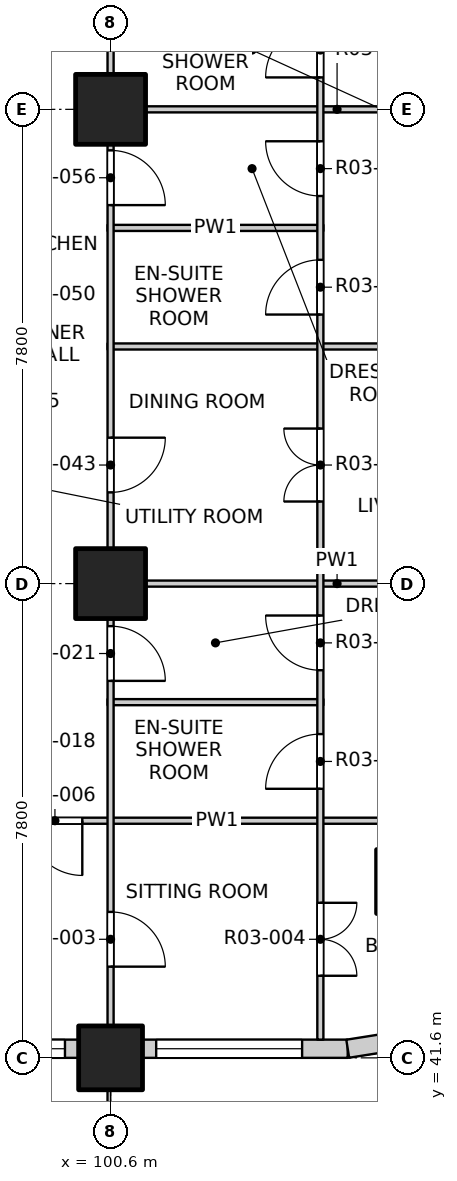
"""IFC4 building model, lengths in metres.
Left out: names, types, materials, properties, quantities, classifications, styles, units other than length and angle.
Written with IfcOpenShell. Run it as: python <this file> out.ifc"""

import sys

from ifc_helpers import new_model, si_unit, direction, frame, frame_2d, origin, origin_2d, place, context, subcontext, project, spatial, rectangle, extrude, element, fill, save


model = new_model("IFC4")
c1 = context("Model", 3, precision=1e-05, world=origin(), true_north=direction((0.0, 1.0)))
c2 = subcontext(c1, "Body", "Model", "MODEL_VIEW")
j1 = project(units=[si_unit("LENGTHUNIT", "METRE"), si_unit("PLANEANGLEUNIT", "RADIAN")], contexts=[c1])
p1 = place(None, origin())
s1 = spatial("IfcSite", under=j1, at=p1, CompositionType="ELEMENT")
p2 = place(p1, origin())
s2 = spatial("IfcBuilding", under=s1, at=p2, CompositionType="ELEMENT")
p3 = place(p2, frame((0.0, 0.0, 43.3)))
s3 = spatial("IfcBuildingStorey", under=s2, at=p3, CompositionType="ELEMENT", Elevation=43.3)
for number, where, z_axis, x_axis in (
    (1, (105.5, 44.5, -0.25), (0.0, 0.0, 1.0), (1.0, 0.0, 0.0)),
    (2, (100.6, 41.6, -0.25), (0.0, 0.0, 1.0), (1.0, 0.0, 0.0)),
):
    element("IfcColumn", number, at=place(p3, frame(where, z_axis=z_axis, x_axis=x_axis)), inside=s3, PredefinedType="COLUMN", context=c2, shape_type="SweptSolid", body=[
        extrude(rectangle(XDim=1.05, YDim=1.05, at=origin_2d()), origin(), (0.0, 0.0, 1.0), 3.35),
    ])
for number, where, z_axis, x_axis in (
    (3, (100.6, 49.4, -0.25), (0.0, 0.0, 1.0), (1.0, 0.0, 0.0)),
    (4, (100.6, 57.2, -0.25), (0.0, 0.0, 1.0), (1.0, 0.0, 0.0)),
):
    element("IfcColumn", number, at=place(p3, frame(where, z_axis=z_axis, x_axis=x_axis)), inside=s3, PredefinedType="COLUMN", context=c2, shape_type="SweptSolid", body=[
        extrude(rectangle(XDim=1.15, YDim=1.15, at=origin_2d()), origin(), (0.0, 0.0, 1.0), 3.35),
    ])
p4 = place(p3, frame((93.325, 41.75, 0.0), z_axis=(0.0, 0.0, 1.0), x_axis=(1.0, 0.0, 0.0)))
e5 = element("IfcWall", 5, at=p4, inside=s3, PredefinedType="SOLIDWALL", context=c2, shape_type="SweptSolid", body=[
    extrude(rectangle(XDim=6.75, YDim=0.3, at=frame_2d((3.375, 0.0))), origin(), (0.0, 0.0, 1.0), 3.1),
])
p5 = place(p4, frame((0.525, 0.0, 0.0)))
e6 = element("IfcOpeningElement", 6, at=p5, cuts=e5, PredefinedType="OPENING", context=c2, shape_type="SweptSolid", body=[
    extrude(rectangle(XDim=1.8, YDim=2.4, at=frame_2d((0.9, 1.2))), frame((0.0, 0.16, 0.0), z_axis=(0.0, -1.0, 0.0), x_axis=(1.0, 0.0, 0.0)), (0.0, 0.0, 1.0), 0.32),
])
p6 = place(p4, frame((4.125, 0.0, 0.9)))
e7 = element("IfcOpeningElement", 7, at=p6, cuts=e5, PredefinedType="OPENING", context=c2, shape_type="SweptSolid", body=[
    extrude(rectangle(XDim=2.4, YDim=1.8, at=frame_2d((1.2, 0.9))), frame((0.0, 0.16, 0.0), z_axis=(0.0, -1.0, 0.0), x_axis=(1.0, 0.0, 0.0)), (0.0, 0.0, 1.0), 0.32),
])
p7 = place(p3, frame((101.125, 41.75, 0.0), z_axis=(0.0, 0.0, 1.0), x_axis=(1.0, 0.0, 0.0)))
e8 = element("IfcWall", 8, at=p7, inside=s3, PredefinedType="SOLIDWALL", context=c2, shape_type="SweptSolid", body=[
    extrude(rectangle(XDim=3.375, YDim=0.3, at=frame_2d((1.688, 0.0))), origin(), (0.0, 0.0, 1.0), 3.1),
])
p8 = place(p7, frame((0.225, 0.0, 0.9)))
e9 = element("IfcOpeningElement", 9, at=p8, cuts=e8, PredefinedType="OPENING", context=c2, shape_type="SweptSolid", body=[
    extrude(rectangle(XDim=2.4, YDim=1.8, at=frame_2d((1.2, 0.9))), frame((0.0, 0.16, 0.0), z_axis=(0.0, -1.0, 0.0), x_axis=(1.0, 0.0, 0.0)), (0.0, 0.0, 1.0), 0.32),
])
p9 = place(p3, frame((104.5, 41.75, 0.0), z_axis=(0.0, 0.0, 1.0), x_axis=(0.987678452879, 0.156496880861, 0.0)))
e10 = element("IfcWall", 10, at=p9, inside=s3, PredefinedType="SOLIDWALL", context=c2, shape_type="SweptSolid", body=[
    extrude(rectangle(XDim=1.173, YDim=0.3, at=frame_2d((0.586, 0.0))), origin(), (0.0, 0.0, 1.0), 3.1),
])
p10 = place(p3, frame((96.6, 45.5, 0.0), z_axis=(0.0, 0.0, 1.0), x_axis=(1.0, 0.0, 0.0)))
e11 = element("IfcWall", 11, at=p10, inside=s3, PredefinedType="PARTITIONING", context=c2, shape_type="SweptSolid", body=[
    extrude(rectangle(XDim=11.5, YDim=0.1, at=frame_2d((5.75, 0.0))), origin(), (0.0, 0.0, 1.0), 3.1),
])
p11 = place(p10, frame((2.635, 0.0, 0.0)))
e12 = element("IfcOpeningElement", 12, at=p11, cuts=e11, PredefinedType="OPENING", context=c2, shape_type="SweptSolid", body=[
    extrude(rectangle(XDim=0.9, YDim=2.1, at=frame_2d((0.45, 1.05))), frame((0.0, 0.06, 0.0), z_axis=(0.0, -1.0, 0.0), x_axis=(1.0, 0.0, 0.0)), (0.0, 0.0, 1.0), 0.12),
])
p12 = place(p3, frame((100.55, 47.45, 0.0), z_axis=(0.0, 0.0, 1.0), x_axis=(1.0, 0.0, 0.0)))
e13 = element("IfcWall", 13, at=p12, inside=s3, PredefinedType="PARTITIONING", context=c2, shape_type="SweptSolid", body=[
    extrude(rectangle(XDim=3.55, YDim=0.1, at=frame_2d((1.775, 0.0))), origin(), (0.0, 0.0, 1.0), 3.1),
])
for number, where, z_axis, x_axis in (
    (14, (100.55, 49.4, 0.0), (0.0, 0.0, 1.0), (1.0, 0.0, 0.0)),
    (15, (100.55, 53.3, 0.0), (0.0, 0.0, 1.0), (1.0, 0.0, 0.0)),
):
    element("IfcWall", number, at=place(p3, frame(where, z_axis=z_axis, x_axis=x_axis)), inside=s3, PredefinedType="PARTITIONING", context=c2, shape_type="SweptSolid", body=[
        extrude(rectangle(XDim=7.55, YDim=0.1, at=frame_2d((3.775, 0.0))), origin(), (0.0, 0.0, 1.0), 3.1),
    ])
p13 = place(p3, frame((100.55, 55.25, 0.0), z_axis=(0.0, 0.0, 1.0), x_axis=(1.0, 0.0, 0.0)))
e16 = element("IfcWall", 16, at=p13, inside=s3, PredefinedType="PARTITIONING", context=c2, shape_type="SweptSolid", body=[
    extrude(rectangle(XDim=3.55, YDim=0.1, at=frame_2d((1.775, 0.0))), origin(), (0.0, 0.0, 1.0), 3.1),
])
p14 = place(p3, frame((100.55, 57.2, 0.0), z_axis=(0.0, 0.0, 1.0), x_axis=(1.0, 0.0, 0.0)))
e17 = element("IfcWall", 17, at=p14, inside=s3, PredefinedType="PARTITIONING", context=c2, shape_type="SweptSolid", body=[
    extrude(rectangle(XDim=7.55, YDim=0.1, at=frame_2d((3.775, 0.0))), origin(), (0.0, 0.0, 1.0), 3.1),
])
p15 = place(p3, frame((100.6, 41.9, 0.0), z_axis=(0.0, 0.0, 1.0), x_axis=(0.0, 1.0, 0.0)))
e18 = element("IfcWall", 18, at=p15, inside=s3, PredefinedType="PARTITIONING", context=c2, shape_type="SweptSolid", body=[
    extrude(rectangle(XDim=46.2, YDim=0.1, at=frame_2d((23.1, 0.0))), origin(), (0.0, 0.0, 1.0), 3.1),
])
p16 = place(p15, frame((1.2, 0.0, 0.0)))
e19 = element("IfcOpeningElement", 19, at=p16, cuts=e18, PredefinedType="OPENING", context=c2, shape_type="SweptSolid", body=[
    extrude(rectangle(XDim=0.9, YDim=2.1, at=frame_2d((0.45, 1.05))), frame((0.0, 0.06, 0.0), z_axis=(0.0, -1.0, 0.0), x_axis=(1.0, 0.0, 0.0)), (0.0, 0.0, 1.0), 0.12),
])
p17 = place(p15, frame((5.9, 0.0, 0.0)))
e20 = element("IfcOpeningElement", 20, at=p17, cuts=e18, PredefinedType="OPENING", context=c2, shape_type="SweptSolid", body=[
    extrude(rectangle(XDim=0.9, YDim=2.1, at=frame_2d((0.45, 1.05))), frame((0.0, 0.06, 0.0), z_axis=(0.0, -1.0, 0.0), x_axis=(1.0, 0.0, 0.0)), (0.0, 0.0, 1.0), 0.12),
])
p18 = place(p15, frame((9.0, 0.0, 0.0)))
e21 = element("IfcOpeningElement", 21, at=p18, cuts=e18, PredefinedType="OPENING", context=c2, shape_type="SweptSolid", body=[
    extrude(rectangle(XDim=0.9, YDim=2.1, at=frame_2d((0.45, 1.05))), frame((0.0, 0.06, 0.0), z_axis=(0.0, -1.0, 0.0), x_axis=(1.0, 0.0, 0.0)), (0.0, 0.0, 1.0), 0.12),
])
p19 = place(p15, frame((13.725, 0.0, 0.0)))
e22 = element("IfcOpeningElement", 22, at=p19, cuts=e18, PredefinedType="OPENING", context=c2, shape_type="SweptSolid", body=[
    extrude(rectangle(XDim=0.9, YDim=2.1, at=frame_2d((0.45, 1.05))), frame((0.0, 0.06, 0.0), z_axis=(0.0, -1.0, 0.0), x_axis=(1.0, 0.0, 0.0)), (0.0, 0.0, 1.0), 0.12),
])
p20 = place(p15, frame((17.775, 0.0, 0.0)))
e23 = element("IfcOpeningElement", 23, at=p20, cuts=e18, PredefinedType="OPENING", context=c2, shape_type="SweptSolid", body=[
    extrude(rectangle(XDim=0.9, YDim=2.1, at=frame_2d((0.45, 1.05))), frame((0.0, 0.06, 0.0), z_axis=(0.0, -1.0, 0.0), x_axis=(1.0, 0.0, 0.0)), (0.0, 0.0, 1.0), 0.12),
])
p21 = place(p15, frame((21.5, 0.0, 0.0)))
e24 = element("IfcOpeningElement", 24, at=p21, cuts=e18, PredefinedType="OPENING", context=c2, shape_type="SweptSolid", body=[
    extrude(rectangle(XDim=0.9, YDim=2.1, at=frame_2d((0.45, 1.05))), frame((0.0, 0.06, 0.0), z_axis=(0.0, -1.0, 0.0), x_axis=(1.0, 0.0, 0.0)), (0.0, 0.0, 1.0), 0.12),
])
p22 = place(p15, frame((24.6, 0.0, 0.0)))
e25 = element("IfcOpeningElement", 25, at=p22, cuts=e18, PredefinedType="OPENING", context=c2, shape_type="SweptSolid", body=[
    extrude(rectangle(XDim=0.9, YDim=2.1, at=frame_2d((0.45, 1.05))), frame((0.0, 0.06, 0.0), z_axis=(0.0, -1.0, 0.0), x_axis=(1.0, 0.0, 0.0)), (0.0, 0.0, 1.0), 0.12),
])
p23 = place(p15, frame((28.5, 0.0, 0.0)))
e26 = element("IfcOpeningElement", 26, at=p23, cuts=e18, PredefinedType="OPENING", context=c2, shape_type="SweptSolid", body=[
    extrude(rectangle(XDim=0.9, YDim=2.1, at=frame_2d((0.45, 1.05))), frame((0.0, 0.06, 0.0), z_axis=(0.0, -1.0, 0.0), x_axis=(1.0, 0.0, 0.0)), (0.0, 0.0, 1.0), 0.12),
])
p24 = place(p15, frame((33.375, 0.0, 0.0)))
e27 = element("IfcOpeningElement", 27, at=p24, cuts=e18, PredefinedType="OPENING", context=c2, shape_type="SweptSolid", body=[
    extrude(rectangle(XDim=0.9, YDim=2.1, at=frame_2d((0.45, 1.05))), frame((0.0, 0.06, 0.0), z_axis=(0.0, -1.0, 0.0), x_axis=(1.0, 0.0, 0.0)), (0.0, 0.0, 1.0), 0.12),
])
p25 = place(p15, frame((37.1, 0.0, 0.0)))
e28 = element("IfcOpeningElement", 28, at=p25, cuts=e18, PredefinedType="OPENING", context=c2, shape_type="SweptSolid", body=[
    extrude(rectangle(XDim=0.9, YDim=2.1, at=frame_2d((0.45, 1.05))), frame((0.0, 0.06, 0.0), z_axis=(0.0, -1.0, 0.0), x_axis=(1.0, 0.0, 0.0)), (0.0, 0.0, 1.0), 0.12),
])
p26 = place(p15, frame((40.2, 0.0, 0.0)))
e29 = element("IfcOpeningElement", 29, at=p26, cuts=e18, PredefinedType="OPENING", context=c2, shape_type="SweptSolid", body=[
    extrude(rectangle(XDim=0.9, YDim=2.1, at=frame_2d((0.45, 1.05))), frame((0.0, 0.06, 0.0), z_axis=(0.0, -1.0, 0.0), x_axis=(1.0, 0.0, 0.0)), (0.0, 0.0, 1.0), 0.12),
])
p27 = place(p15, frame((44.1, 0.0, 0.0)))
e30 = element("IfcOpeningElement", 30, at=p27, cuts=e18, PredefinedType="OPENING", context=c2, shape_type="SweptSolid", body=[
    extrude(rectangle(XDim=0.9, YDim=2.1, at=frame_2d((0.45, 1.05))), frame((0.0, 0.06, 0.0), z_axis=(0.0, -1.0, 0.0), x_axis=(1.0, 0.0, 0.0)), (0.0, 0.0, 1.0), 0.12),
])
p28 = place(p3, frame((104.05, 41.9, 0.0), z_axis=(0.0, 0.0, 1.0), x_axis=(0.0, 1.0, 0.0)))
e31 = element("IfcWall", 31, at=p28, inside=s3, PredefinedType="PARTITIONING", context=c2, shape_type="SweptSolid", body=[
    extrude(rectangle(XDim=46.2, YDim=0.1, at=frame_2d((23.1, 0.0))), origin(), (0.0, 0.0, 1.0), 3.1),
])
p29 = place(p28, frame((1.05, 0.0, 0.0)))
e32 = element("IfcOpeningElement", 32, at=p29, cuts=e31, PredefinedType="OPENING", context=c2, shape_type="SweptSolid", body=[
    extrude(rectangle(XDim=1.2, YDim=2.1, at=frame_2d((0.6, 1.05))), frame((0.0, 0.06, 0.0), z_axis=(0.0, -1.0, 0.0), x_axis=(1.0, 0.0, 0.0)), (0.0, 0.0, 1.0), 0.12),
])
p30 = place(p28, frame((4.125, 0.0, 0.0)))
e33 = element("IfcOpeningElement", 33, at=p30, cuts=e31, PredefinedType="OPENING", context=c2, shape_type="SweptSolid", body=[
    extrude(rectangle(XDim=0.9, YDim=2.1, at=frame_2d((0.45, 1.05))), frame((0.0, 0.06, 0.0), z_axis=(0.0, -1.0, 0.0), x_axis=(1.0, 0.0, 0.0)), (0.0, 0.0, 1.0), 0.12),
])
p31 = place(p28, frame((6.075, 0.0, 0.0)))
e34 = element("IfcOpeningElement", 34, at=p31, cuts=e31, PredefinedType="OPENING", context=c2, shape_type="SweptSolid", body=[
    extrude(rectangle(XDim=0.9, YDim=2.1, at=frame_2d((0.45, 1.05))), frame((0.0, 0.06, 0.0), z_axis=(0.0, -1.0, 0.0), x_axis=(1.0, 0.0, 0.0)), (0.0, 0.0, 1.0), 0.12),
])
p32 = place(p28, frame((8.85, 0.0, 0.0)))
e35 = element("IfcOpeningElement", 35, at=p32, cuts=e31, PredefinedType="OPENING", context=c2, shape_type="SweptSolid", body=[
    extrude(rectangle(XDim=1.2, YDim=2.1, at=frame_2d((0.6, 1.05))), frame((0.0, 0.06, 0.0), z_axis=(0.0, -1.0, 0.0), x_axis=(1.0, 0.0, 0.0)), (0.0, 0.0, 1.0), 0.12),
])
p33 = place(p28, frame((11.925, 0.0, 0.0)))
e36 = element("IfcOpeningElement", 36, at=p33, cuts=e31, PredefinedType="OPENING", context=c2, shape_type="SweptSolid", body=[
    extrude(rectangle(XDim=0.9, YDim=2.1, at=frame_2d((0.45, 1.05))), frame((0.0, 0.06, 0.0), z_axis=(0.0, -1.0, 0.0), x_axis=(1.0, 0.0, 0.0)), (0.0, 0.0, 1.0), 0.12),
])
p34 = place(p28, frame((13.875, 0.0, 0.0)))
e37 = element("IfcOpeningElement", 37, at=p34, cuts=e31, PredefinedType="OPENING", context=c2, shape_type="SweptSolid", body=[
    extrude(rectangle(XDim=0.9, YDim=2.1, at=frame_2d((0.45, 1.05))), frame((0.0, 0.06, 0.0), z_axis=(0.0, -1.0, 0.0), x_axis=(1.0, 0.0, 0.0)), (0.0, 0.0, 1.0), 0.12),
])
p35 = place(p28, frame((15.825, 0.0, 0.0)))
e38 = element("IfcOpeningElement", 38, at=p35, cuts=e31, PredefinedType="OPENING", context=c2, shape_type="SweptSolid", body=[
    extrude(rectangle(XDim=0.9, YDim=2.1, at=frame_2d((0.45, 1.05))), frame((0.0, 0.06, 0.0), z_axis=(0.0, -1.0, 0.0), x_axis=(1.0, 0.0, 0.0)), (0.0, 0.0, 1.0), 0.12),
])
p36 = place(p28, frame((17.775, 0.0, 0.0)))
e39 = element("IfcOpeningElement", 39, at=p36, cuts=e31, PredefinedType="OPENING", context=c2, shape_type="SweptSolid", body=[
    extrude(rectangle(XDim=0.9, YDim=2.1, at=frame_2d((0.45, 1.05))), frame((0.0, 0.06, 0.0), z_axis=(0.0, -1.0, 0.0), x_axis=(1.0, 0.0, 0.0)), (0.0, 0.0, 1.0), 0.12),
])
p37 = place(p28, frame((19.725, 0.0, 0.0)))
e40 = element("IfcOpeningElement", 40, at=p37, cuts=e31, PredefinedType="OPENING", context=c2, shape_type="SweptSolid", body=[
    extrude(rectangle(XDim=0.9, YDim=2.1, at=frame_2d((0.45, 1.05))), frame((0.0, 0.06, 0.0), z_axis=(0.0, -1.0, 0.0), x_axis=(1.0, 0.0, 0.0)), (0.0, 0.0, 1.0), 0.12),
])
p38 = place(p28, frame((21.675, 0.0, 0.0)))
e41 = element("IfcOpeningElement", 41, at=p38, cuts=e31, PredefinedType="OPENING", context=c2, shape_type="SweptSolid", body=[
    extrude(rectangle(XDim=0.9, YDim=2.1, at=frame_2d((0.45, 1.05))), frame((0.0, 0.06, 0.0), z_axis=(0.0, -1.0, 0.0), x_axis=(1.0, 0.0, 0.0)), (0.0, 0.0, 1.0), 0.12),
])
p39 = place(p28, frame((24.45, 0.0, 0.0)))
e42 = element("IfcOpeningElement", 42, at=p39, cuts=e31, PredefinedType="OPENING", context=c2, shape_type="SweptSolid", body=[
    extrude(rectangle(XDim=1.2, YDim=2.1, at=frame_2d((0.6, 1.05))), frame((0.0, 0.06, 0.0), z_axis=(0.0, -1.0, 0.0), x_axis=(1.0, 0.0, 0.0)), (0.0, 0.0, 1.0), 0.12),
])
p40 = place(p28, frame((28.35, 0.0, 0.0)))
e43 = element("IfcOpeningElement", 43, at=p40, cuts=e31, PredefinedType="OPENING", context=c2, shape_type="SweptSolid", body=[
    extrude(rectangle(XDim=1.2, YDim=2.1, at=frame_2d((0.6, 1.05))), frame((0.0, 0.06, 0.0), z_axis=(0.0, -1.0, 0.0), x_axis=(1.0, 0.0, 0.0)), (0.0, 0.0, 1.0), 0.12),
])
p41 = place(p28, frame((31.425, 0.0, 0.0)))
e44 = element("IfcOpeningElement", 44, at=p41, cuts=e31, PredefinedType="OPENING", context=c2, shape_type="SweptSolid", body=[
    extrude(rectangle(XDim=0.9, YDim=2.1, at=frame_2d((0.45, 1.05))), frame((0.0, 0.06, 0.0), z_axis=(0.0, -1.0, 0.0), x_axis=(1.0, 0.0, 0.0)), (0.0, 0.0, 1.0), 0.12),
])
p42 = place(p28, frame((33.375, 0.0, 0.0)))
e45 = element("IfcOpeningElement", 45, at=p42, cuts=e31, PredefinedType="OPENING", context=c2, shape_type="SweptSolid", body=[
    extrude(rectangle(XDim=0.9, YDim=2.1, at=frame_2d((0.45, 1.05))), frame((0.0, 0.06, 0.0), z_axis=(0.0, -1.0, 0.0), x_axis=(1.0, 0.0, 0.0)), (0.0, 0.0, 1.0), 0.12),
])
p43 = place(p28, frame((35.325, 0.0, 0.0)))
e46 = element("IfcOpeningElement", 46, at=p43, cuts=e31, PredefinedType="OPENING", context=c2, shape_type="SweptSolid", body=[
    extrude(rectangle(XDim=0.9, YDim=2.1, at=frame_2d((0.45, 1.05))), frame((0.0, 0.06, 0.0), z_axis=(0.0, -1.0, 0.0), x_axis=(1.0, 0.0, 0.0)), (0.0, 0.0, 1.0), 0.12),
])
p44 = place(p28, frame((37.275, 0.0, 0.0)))
e47 = element("IfcOpeningElement", 47, at=p44, cuts=e31, PredefinedType="OPENING", context=c2, shape_type="SweptSolid", body=[
    extrude(rectangle(XDim=0.9, YDim=2.1, at=frame_2d((0.45, 1.05))), frame((0.0, 0.06, 0.0), z_axis=(0.0, -1.0, 0.0), x_axis=(1.0, 0.0, 0.0)), (0.0, 0.0, 1.0), 0.12),
])
p45 = place(p28, frame((40.05, 0.0, 0.0)))
e48 = element("IfcOpeningElement", 48, at=p45, cuts=e31, PredefinedType="OPENING", context=c2, shape_type="SweptSolid", body=[
    extrude(rectangle(XDim=1.2, YDim=2.1, at=frame_2d((0.6, 1.05))), frame((0.0, 0.06, 0.0), z_axis=(0.0, -1.0, 0.0), x_axis=(1.0, 0.0, 0.0)), (0.0, 0.0, 1.0), 0.12),
])
p46 = place(p28, frame((43.95, 0.0, 0.0)))
e49 = element("IfcOpeningElement", 49, at=p46, cuts=e31, PredefinedType="OPENING", context=c2, shape_type="SweptSolid", body=[
    extrude(rectangle(XDim=1.2, YDim=2.1, at=frame_2d((0.6, 1.05))), frame((0.0, 0.06, 0.0), z_axis=(0.0, -1.0, 0.0), x_axis=(1.0, 0.0, 0.0)), (0.0, 0.0, 1.0), 0.12),
])
p47 = place(p6, origin())
e50 = element("IfcWindow", 50, at=p47, inside=s3, PartitioningType="DOUBLE_PANEL_VERTICAL", PredefinedType="WINDOW", context=c2, shape_type="SweptSolid", body=[
    extrude(rectangle(XDim=2.4, YDim=1.8, at=frame_2d((1.2, 0.9))), frame((0.0, 0.03, 0.0), z_axis=(0.0, -1.0, 0.0), x_axis=(1.0, 0.0, 0.0)), (0.0, 0.0, 1.0), 0.06),
])
fill(e7, e50)
p48 = place(p8, origin())
e51 = element("IfcWindow", 51, at=p48, inside=s3, PartitioningType="DOUBLE_PANEL_VERTICAL", PredefinedType="WINDOW", context=c2, shape_type="SweptSolid", body=[
    extrude(rectangle(XDim=2.4, YDim=1.8, at=frame_2d((1.2, 0.9))), frame((0.0, 0.03, 0.0), z_axis=(0.0, -1.0, 0.0), x_axis=(1.0, 0.0, 0.0)), (0.0, 0.0, 1.0), 0.06),
])
fill(e9, e51)
p49 = place(p16, origin())
e52 = element("IfcDoor", 52, at=p49, inside=s3, OperationType="SINGLE_SWING_RIGHT", PredefinedType="DOOR", context=c2, shape_type="SweptSolid", body=[
    extrude(rectangle(XDim=0.9, YDim=2.1, at=frame_2d((0.45, 1.05))), frame((0.0, 0.025, 0.0), z_axis=(0.0, -1.0, 0.0), x_axis=(1.0, 0.0, 0.0)), (0.0, 0.0, 1.0), 0.05),
])
fill(e19, e52)
p50 = place(p29, origin())
e53 = element("IfcDoor", 53, at=p50, inside=s3, OperationType="DOUBLE_DOOR_SINGLE_SWING", PredefinedType="DOOR", context=c2, shape_type="SweptSolid", body=[
    extrude(rectangle(XDim=1.2, YDim=2.1, at=frame_2d((0.6, 1.05))), frame((0.0, 0.025, 0.0), z_axis=(0.0, -1.0, 0.0), x_axis=(1.0, 0.0, 0.0)), (0.0, 0.0, 1.0), 0.05),
])
fill(e32, e53)
p51 = place(p11, origin())
e54 = element("IfcDoor", 54, at=p51, inside=s3, OperationType="SINGLE_SWING_LEFT", PredefinedType="DOOR", context=c2, shape_type="SweptSolid", body=[
    extrude(rectangle(XDim=0.9, YDim=2.1, at=frame_2d((0.45, 1.05))), frame((0.0, 0.025, 0.0), z_axis=(0.0, -1.0, 0.0), x_axis=(1.0, 0.0, 0.0)), (0.0, 0.0, 1.0), 0.05),
])
fill(e12, e54)
p52 = place(p30, origin())
e55 = element("IfcDoor", 55, at=p52, inside=s3, OperationType="SINGLE_SWING_LEFT", PredefinedType="DOOR", context=c2, shape_type="SweptSolid", body=[
    extrude(rectangle(XDim=0.9, YDim=2.1, at=frame_2d((0.45, 1.05))), frame((0.0, 0.025, 0.0), z_axis=(0.0, -1.0, 0.0), x_axis=(1.0, 0.0, 0.0)), (0.0, 0.0, 1.0), 0.05),
])
fill(e33, e55)
p53 = place(p17, origin())
e56 = element("IfcDoor", 56, at=p53, inside=s3, OperationType="SINGLE_SWING_RIGHT", PredefinedType="DOOR", context=c2, shape_type="SweptSolid", body=[
    extrude(rectangle(XDim=0.9, YDim=2.1, at=frame_2d((0.45, 1.05))), frame((0.0, 0.025, 0.0), z_axis=(0.0, -1.0, 0.0), x_axis=(1.0, 0.0, 0.0)), (0.0, 0.0, 1.0), 0.05),
])
fill(e20, e56)
p54 = place(p31, origin())
e57 = element("IfcDoor", 57, at=p54, inside=s3, OperationType="SINGLE_SWING_RIGHT", PredefinedType="DOOR", context=c2, shape_type="SweptSolid", body=[
    extrude(rectangle(XDim=0.9, YDim=2.1, at=frame_2d((0.45, 1.05))), frame((0.0, 0.025, 0.0), z_axis=(0.0, -1.0, 0.0), x_axis=(1.0, 0.0, 0.0)), (0.0, 0.0, 1.0), 0.05),
])
fill(e34, e57)
p55 = place(p18, origin())
e58 = element("IfcDoor", 58, at=p55, inside=s3, OperationType="SINGLE_SWING_LEFT", PredefinedType="DOOR", context=c2, shape_type="SweptSolid", body=[
    extrude(rectangle(XDim=0.9, YDim=2.1, at=frame_2d((0.45, 1.05))), frame((0.0, 0.025, 0.0), z_axis=(0.0, -1.0, 0.0), x_axis=(1.0, 0.0, 0.0)), (0.0, 0.0, 1.0), 0.05),
])
fill(e21, e58)
p56 = place(p32, origin())
e59 = element("IfcDoor", 59, at=p56, inside=s3, OperationType="DOUBLE_DOOR_SINGLE_SWING", PredefinedType="DOOR", context=c2, shape_type="SweptSolid", body=[
    extrude(rectangle(XDim=1.2, YDim=2.1, at=frame_2d((0.6, 1.05))), frame((0.0, 0.025, 0.0), z_axis=(0.0, -1.0, 0.0), x_axis=(1.0, 0.0, 0.0)), (0.0, 0.0, 1.0), 0.05),
])
fill(e35, e59)
p57 = place(p33, origin())
e60 = element("IfcDoor", 60, at=p57, inside=s3, OperationType="SINGLE_SWING_LEFT", PredefinedType="DOOR", context=c2, shape_type="SweptSolid", body=[
    extrude(rectangle(XDim=0.9, YDim=2.1, at=frame_2d((0.45, 1.05))), frame((0.0, 0.025, 0.0), z_axis=(0.0, -1.0, 0.0), x_axis=(1.0, 0.0, 0.0)), (0.0, 0.0, 1.0), 0.05),
])
fill(e36, e60)
p58 = place(p19, origin())
e61 = element("IfcDoor", 61, at=p58, inside=s3, OperationType="SINGLE_SWING_RIGHT", PredefinedType="DOOR", context=c2, shape_type="SweptSolid", body=[
    extrude(rectangle(XDim=0.9, YDim=2.1, at=frame_2d((0.45, 1.05))), frame((0.0, 0.025, 0.0), z_axis=(0.0, -1.0, 0.0), x_axis=(1.0, 0.0, 0.0)), (0.0, 0.0, 1.0), 0.05),
])
fill(e22, e61)
p59 = place(p34, origin())
e62 = element("IfcDoor", 62, at=p59, inside=s3, OperationType="SINGLE_SWING_RIGHT", PredefinedType="DOOR", context=c2, shape_type="SweptSolid", body=[
    extrude(rectangle(XDim=0.9, YDim=2.1, at=frame_2d((0.45, 1.05))), frame((0.0, 0.025, 0.0), z_axis=(0.0, -1.0, 0.0), x_axis=(1.0, 0.0, 0.0)), (0.0, 0.0, 1.0), 0.05),
])
fill(e37, e62)
p60 = place(p35, origin())
e63 = element("IfcDoor", 63, at=p60, inside=s3, OperationType="SINGLE_SWING_LEFT", PredefinedType="DOOR", context=c2, shape_type="SweptSolid", body=[
    extrude(rectangle(XDim=0.9, YDim=2.1, at=frame_2d((0.45, 1.05))), frame((0.0, 0.025, 0.0), z_axis=(0.0, -1.0, 0.0), x_axis=(1.0, 0.0, 0.0)), (0.0, 0.0, 1.0), 0.05),
])
fill(e38, e63)
save(model, sys.argv[1])
